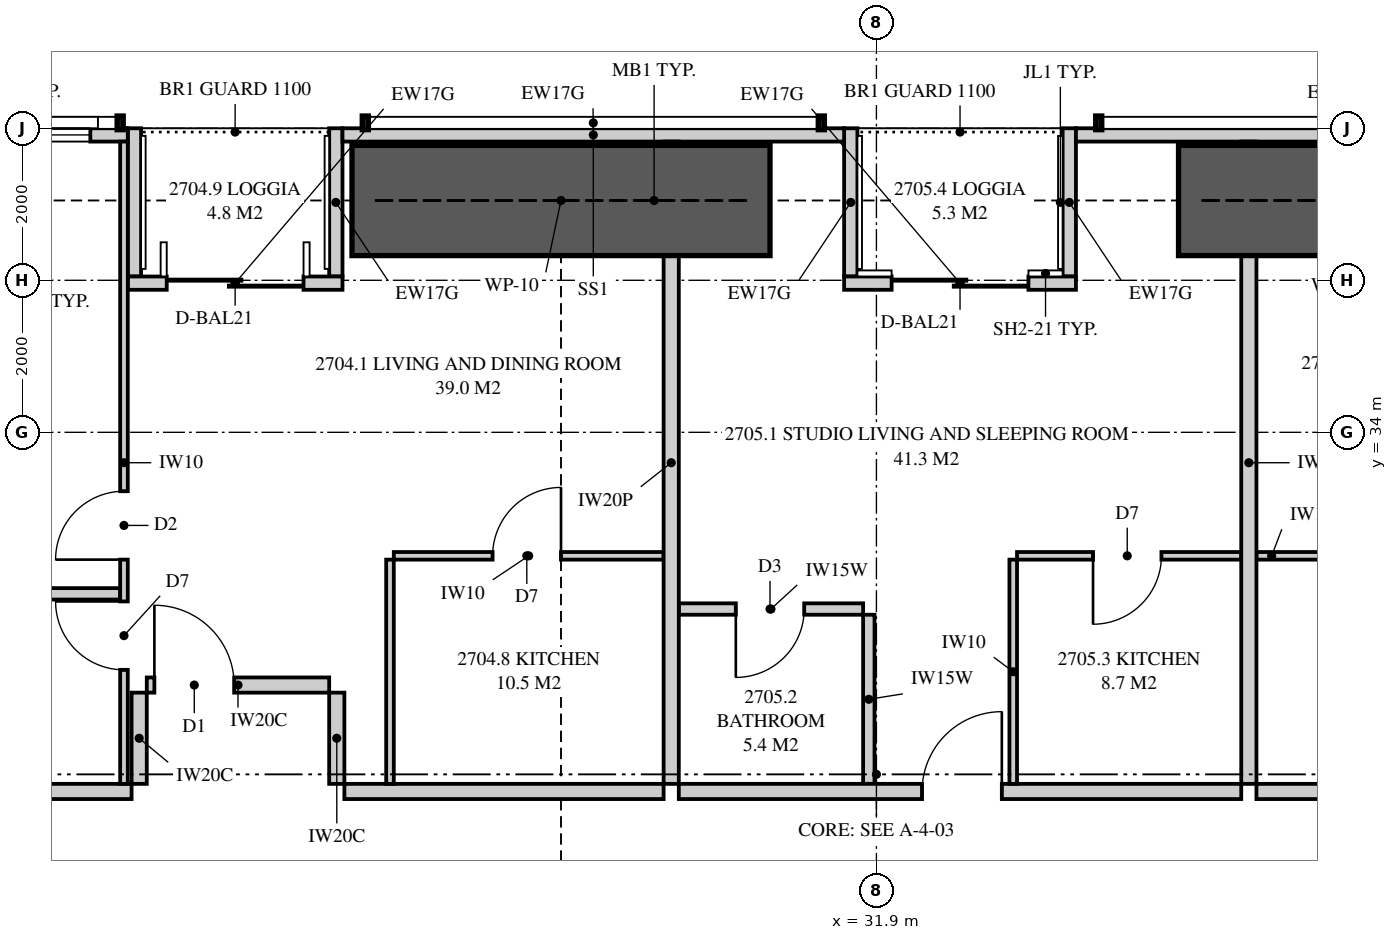
"""IFC4 building model, lengths in metres.
Left out: names, types, materials, properties, quantities, classifications, styles, units other than length and angle.
Written with IfcOpenShell. Run it as: python <this file> out.ifc"""

import sys

from ifc_helpers import new_model, si_unit, direction, frame, frame_2d, origin, place, context, subcontext, project, spatial, polyline, rectangle, outline, extrude, element, fill, save


model = new_model("IFC4")
c1 = context("Model", 3, precision=1e-05, world=origin(), true_north=direction((0.0, 1.0)))
c2 = subcontext(c1, "Body", "Model", "MODEL_VIEW")
j1 = project(units=[si_unit("LENGTHUNIT", "METRE"), si_unit("PLANEANGLEUNIT", "RADIAN")], contexts=[c1])
p1 = place(None, origin())
s1 = spatial("IfcSite", under=j1, at=p1, CompositionType="ELEMENT")
p2 = place(p1, origin())
s2 = spatial("IfcBuilding", under=s1, at=p2, CompositionType="ELEMENT")
p3 = place(p2, frame((0.0, 0.0, 101.5)))
s3 = spatial("IfcBuildingStorey", under=s2, at=p3, CompositionType="ELEMENT", Elevation=101.5)
p4 = place(p3, frame((41.449, 37.913, 0.0), z_axis=(0.0, 0.0, 1.0), x_axis=(-1.0, 0.0, 0.0)))
e1 = element("IfcWall", 1, at=p4, inside=s3, PredefinedType="SOLIDWALL", context=c2, shape_type="SweptSolid", body=[
    extrude(outline(polyline([(0.0, 0.0), (6.924, 0.0), (6.924, 2.15), (2.824, 2.15), (2.824, 3.11), (2.666, 3.11), (2.666, 2.15), (2.62, 2.15), (2.62, 3.11), (0.0, 3.11), (0.0, 0.0)])), frame((0.0, 0.087, 0.0), z_axis=(0.0, -1.0, 0.0), x_axis=(1.0, 0.0, 0.0)), (0.0, 0.0, 1.0), 0.175),
])
p5 = place(p3, frame((31.475, 37.913, 0.0), z_axis=(0.0, 0.0, 1.0), x_axis=(-1.0, 0.0, 0.0)))
e2 = element("IfcWall", 2, at=p5, inside=s3, PredefinedType="SOLIDWALL", context=c2, shape_type="SweptSolid", body=[
    extrude(rectangle(XDim=6.6, YDim=0.175, at=frame_2d((3.3, 0.0))), origin(), (0.0, 0.0, 1.0), 2.15),
])
p6 = place(p3, frame((22.05, 37.913, 0.0), z_axis=(0.0, 0.0, 1.0), x_axis=(-1.0, 0.0, 0.0)))
e3 = element("IfcWall", 3, at=p6, inside=s3, PredefinedType="SOLIDWALL", context=c2, shape_type="SweptSolid", body=[
    extrude(outline(polyline([(0.0, 0.0), (12.999, 0.0), (12.999, 3.11), (5.378, 3.11), (5.378, 2.15), (5.333, 2.15), (5.333, 3.11), (5.175, 3.11), (5.175, 2.15), (0.0, 2.15), (0.0, 0.0)])), frame((0.0, 0.087, 0.0), z_axis=(0.0, -1.0, 0.0), x_axis=(1.0, 0.0, 0.0)), (0.0, 0.0, 1.0), 0.175),
])
p7 = place(p6, frame((0.492, 0.0, 0.4)))
e4 = element("IfcOpeningElement", 4, at=p7, cuts=e3, PredefinedType="OPENING", context=c2, shape_type="SweptSolid", body=[
    extrude(rectangle(XDim=1.8, YDim=1.7, at=frame_2d((0.9, 0.85))), frame((0.0, 0.097, 0.0), z_axis=(0.0, -1.0, 0.0), x_axis=(1.0, 0.0, 0.0)), (0.0, 0.0, 1.0), 0.195),
])
p8 = place(p6, frame((8.065, 0.0, 0.4)))
e5 = element("IfcOpeningElement", 5, at=p8, cuts=e3, PredefinedType="OPENING", context=c2, shape_type="SweptSolid", body=[
    extrude(rectangle(XDim=1.8, YDim=1.7, at=frame_2d((0.9, 0.85))), frame((0.0, 0.097, 0.0), z_axis=(0.0, -1.0, 0.0), x_axis=(1.0, 0.0, 0.0)), (0.0, 0.0, 1.0), 0.195),
])
p9 = place(p3, frame((34.525, 35.962, 0.0), z_axis=(0.0, 0.0, 1.0), x_axis=(-1.0, 0.0, 0.0)))
e6 = element("IfcWall", 6, at=p9, inside=s3, PredefinedType="SOLIDWALL", context=c2, shape_type="SweptSolid", body=[
    extrude(rectangle(XDim=3.05, YDim=0.175, at=frame_2d((1.525, 0.0))), origin(), (0.0, 0.0, 1.0), 3.11),
])
p10 = place(p9, frame((0.625, 0.0, 0.0)))
e7 = element("IfcOpeningElement", 7, at=p10, cuts=e6, PredefinedType="OPENING", context=c2, shape_type="SweptSolid", body=[
    extrude(rectangle(XDim=1.8, YDim=2.1, at=frame_2d((0.9, 1.05))), frame((0.0, 0.097, 0.0), z_axis=(0.0, -1.0, 0.0), x_axis=(1.0, 0.0, 0.0)), (0.0, 0.0, 1.0), 0.195),
])
for number, where, z_axis, x_axis in (
    (8, (34.438, 38.0, 0.0), (0.0, 0.0, 1.0), (0.0, -1.0, 0.0)),
    (9, (31.562, 38.0, 0.0), (0.0, 0.0, 1.0), (0.0, -1.0, 0.0)),
):
    element("IfcWall", number, at=place(p3, frame(where, z_axis=z_axis, x_axis=x_axis)), inside=s3, PredefinedType="SOLIDWALL", context=c2, shape_type="SweptSolid", body=[
        extrude(outline(polyline([(0.0, 0.0), (1.95, 0.0), (1.95, 3.11), (1.75, 3.11), (1.75, 2.15), (0.15, 2.15), (0.15, 3.11), (0.0, 3.11), (0.0, 0.0)])), frame((0.0, 0.087, 0.0), z_axis=(0.0, -1.0, 0.0), x_axis=(1.0, 0.0, 0.0)), (0.0, 0.0, 1.0), 0.175),
    ])
p11 = place(p3, frame((24.875, 35.962, 0.0), z_axis=(0.0, 0.0, 1.0), x_axis=(-1.0, 0.0, 0.0)))
e10 = element("IfcWall", 10, at=p11, inside=s3, PredefinedType="SOLIDWALL", context=c2, shape_type="SweptSolid", body=[
    extrude(rectangle(XDim=2.825, YDim=0.175, at=frame_2d((1.413, 0.0))), origin(), (0.0, 0.0, 1.0), 3.11),
])
p12 = place(p11, frame((0.512, 0.0, 0.0)))
e11 = element("IfcOpeningElement", 11, at=p12, cuts=e10, PredefinedType="OPENING", context=c2, shape_type="SweptSolid", body=[
    extrude(rectangle(XDim=1.8, YDim=2.1, at=frame_2d((0.9, 1.05))), frame((0.0, 0.097, 0.0), z_axis=(0.0, -1.0, 0.0), x_axis=(1.0, 0.0, 0.0)), (0.0, 0.0, 1.0), 0.195),
])
for number, where, z_axis, x_axis in (
    (12, (24.788, 38.0, 0.0), (0.0, 0.0, 1.0), (0.0, -1.0, 0.0)),
    (13, (22.137, 38.0, 0.0), (0.0, 0.0, 1.0), (0.0, -1.0, 0.0)),
):
    element("IfcWall", number, at=place(p3, frame(where, z_axis=z_axis, x_axis=x_axis)), inside=s3, PredefinedType="SOLIDWALL", context=c2, shape_type="SweptSolid", body=[
        extrude(outline(polyline([(0.0, 0.0), (1.95, 0.0), (1.95, 3.11), (1.75, 3.11), (1.75, 2.15), (0.15, 2.15), (0.15, 3.11), (0.0, 3.11), (0.0, 0.0)])), frame((0.0, 0.087, 0.0), z_axis=(0.0, -1.0, 0.0), x_axis=(1.0, 0.0, 0.0)), (0.0, 0.0, 1.0), 0.175),
    ])
p13 = place(p3, frame((29.2, 37.825, 0.0), z_axis=(0.0, 0.0, 1.0), x_axis=(0.0, -1.0, 0.0)))
e14 = element("IfcWall", 14, at=p13, inside=s3, PredefinedType="PARTITIONING", context=c2, shape_type="SweptSolid", body=[
    extrude(outline(polyline([(0.529, 2.15), (0.0, 2.15), (0.0, 0.0), (0.529, 0.0), (0.529, 0.513), (1.021, 0.513), (1.021, 0.0), (8.45, 0.0), (8.45, 3.11), (1.685, 3.11), (1.685, 2.15), (1.021, 2.15), (1.021, 1.637), (0.529, 1.637), (0.529, 2.15)])), frame((0.0, 0.1, 0.0), z_axis=(0.0, -1.0, 0.0), x_axis=(1.0, 0.0, 0.0)), (0.0, 0.0, 1.0), 0.2),
])
p14 = place(p3, frame((17.775, 29.275, 0.0), z_axis=(0.0, 0.0, 1.0), x_axis=(1.0, 0.0, 0.0)))
e15 = element("IfcWall", 15, at=p14, inside=s3, PredefinedType="PARTITIONING", context=c2, shape_type="SweptSolid", body=[
    extrude(rectangle(XDim=4.325, YDim=0.2, at=frame_2d((2.163, 0.0))), origin(), (0.0, 0.0, 1.0), 3.11),
])
p15 = place(p3, frame((22.0, 37.825, 0.0), z_axis=(0.0, 0.0, 1.0), x_axis=(0.0, -1.0, 0.0)))
e16 = element("IfcWall", 16, at=p15, inside=s3, PredefinedType="PARTITIONING", context=c2, shape_type="SweptSolid", body=[
    extrude(outline(polyline([(0.0, 0.0), (8.45, 0.0), (8.45, 3.11), (1.635, 3.11), (1.635, 2.15), (0.0, 2.15), (0.0, 3.11), (0.0, 0.0)])), frame((0.0, 0.05, 0.0), z_axis=(0.0, -1.0, 0.0), x_axis=(1.0, 0.0, 0.0)), (0.0, 0.0, 1.0), 0.1),
])
p16 = place(p15, frame((4.6, 0.0, 0.0)))
e17 = element("IfcOpeningElement", 17, at=p16, cuts=e16, PredefinedType="OPENING", context=c2, shape_type="SweptSolid", body=[
    extrude(rectangle(XDim=0.9, YDim=2.1, at=frame_2d((0.45, 1.05))), frame((0.0, 0.06, 0.0), z_axis=(0.0, -1.0, 0.0), x_axis=(1.0, 0.0, 0.0)), (0.0, 0.0, 1.0), 0.12),
])
p17 = place(p15, frame((6.05, 0.0, 0.0)))
e18 = element("IfcOpeningElement", 18, at=p17, cuts=e16, PredefinedType="OPENING", context=c2, shape_type="SweptSolid", body=[
    extrude(rectangle(XDim=0.9, YDim=2.1, at=frame_2d((0.45, 1.05))), frame((0.0, 0.06, 0.0), z_axis=(0.0, -1.0, 0.0), x_axis=(1.0, 0.0, 0.0)), (0.0, 0.0, 1.0), 0.12),
])
p18 = place(p3, frame((17.75, 31.875, 0.0), z_axis=(0.0, 0.0, 1.0), x_axis=(1.0, 0.0, 0.0)))
e19 = element("IfcWall", 19, at=p18, inside=s3, PredefinedType="PLUMBINGWALL", context=c2, shape_type="SweptSolid", body=[
    extrude(rectangle(XDim=4.2, YDim=0.15, at=frame_2d((2.1, 0.0))), origin(), (0.0, 0.0, 1.0), 3.11),
])
p19 = place(p3, frame((25.55, 32.375, 0.0), z_axis=(0.0, 0.0, 1.0), x_axis=(1.0, 0.0, 0.0)))
e20 = element("IfcWall", 20, at=p19, inside=s3, PredefinedType="PARTITIONING", context=c2, shape_type="SweptSolid", body=[
    extrude(outline(polyline([(0.0, 0.0), (3.55, 0.0), (3.55, 3.11), (2.487, 3.11), (2.487, 2.541), (1.913, 2.541), (1.913, 3.11), (0.0, 3.11), (0.0, 0.0)])), frame((0.0, 0.05, 0.0), z_axis=(0.0, -1.0, 0.0), x_axis=(1.0, 0.0, 0.0)), (0.0, 0.0, 1.0), 0.1),
])
p20 = place(p19, frame((1.3, 0.0, 0.0)))
e21 = element("IfcOpeningElement", 21, at=p20, cuts=e20, PredefinedType="OPENING", context=c2, shape_type="SweptSolid", body=[
    extrude(rectangle(XDim=0.9, YDim=2.1, at=frame_2d((0.45, 1.05))), frame((0.0, 0.06, 0.0), z_axis=(0.0, -1.0, 0.0), x_axis=(1.0, 0.0, 0.0)), (0.0, 0.0, 1.0), 0.12),
])
p21 = place(p3, frame((25.5, 32.325, 0.0), z_axis=(0.0, 0.0, 1.0), x_axis=(0.0, -1.0, 0.0)))
e22 = element("IfcWall", 22, at=p21, inside=s3, PredefinedType="PARTITIONING", context=c2, shape_type="SweptSolid", body=[
    extrude(rectangle(XDim=2.95, YDim=0.1, at=frame_2d((1.475, 0.0))), origin(), (0.0, 0.0, 1.0), 3.11),
])
p22 = place(p3, frame((36.8, 37.825, 0.0), z_axis=(0.0, 0.0, 1.0), x_axis=(0.0, -1.0, 0.0)))
e23 = element("IfcWall", 23, at=p22, inside=s3, PredefinedType="PARTITIONING", context=c2, shape_type="SweptSolid", body=[
    extrude(outline(polyline([(0.529, 2.15), (0.0, 2.15), (0.0, 0.0), (0.529, 0.0), (0.529, 0.256), (1.021, 0.256), (1.021, 0.0), (8.45, 0.0), (8.45, 3.11), (1.685, 3.11), (1.685, 2.15), (1.021, 2.15), (1.021, 1.894), (0.529, 1.894), (0.529, 2.15)])), frame((0.0, 0.1, 0.0), z_axis=(0.0, -1.0, 0.0), x_axis=(1.0, 0.0, 0.0)), (0.0, 0.0, 1.0), 0.2),
])
p23 = place(p3, frame((29.3, 29.275, 0.0), z_axis=(0.0, 0.0, 1.0), x_axis=(1.0, 0.0, 0.0)))
e24 = element("IfcWall", 24, at=p23, inside=s3, PredefinedType="PARTITIONING", context=c2, shape_type="SweptSolid", body=[
    extrude(rectangle(XDim=7.4, YDim=0.2, at=frame_2d((3.7, 0.0))), origin(), (0.0, 0.0, 1.0), 3.11),
])
p24 = place(p23, frame((3.2, 0.0, 0.0)))
e25 = element("IfcOpeningElement", 25, at=p24, cuts=e24, PredefinedType="OPENING", context=c2, shape_type="SweptSolid", body=[
    extrude(rectangle(XDim=1.05, YDim=2.2, at=frame_2d((0.525, 1.1))), frame((0.0, 0.11, 0.0), z_axis=(0.0, -1.0, 0.0), x_axis=(1.0, 0.0, 0.0)), (0.0, 0.0, 1.0), 0.22),
])
p25 = place(p3, frame((29.3, 31.675, 0.0), z_axis=(0.0, 0.0, 1.0), x_axis=(1.0, 0.0, 0.0)))
e26 = element("IfcWall", 26, at=p25, inside=s3, PredefinedType="PLUMBINGWALL", context=c2, shape_type="SweptSolid", body=[
    extrude(rectangle(XDim=2.425, YDim=0.15, at=frame_2d((1.212, 0.0))), origin(), (0.0, 0.0, 1.0), 3.11),
])
p26 = place(p25, frame((0.75, 0.0, 0.0)))
e27 = element("IfcOpeningElement", 27, at=p26, cuts=e26, PredefinedType="OPENING", context=c2, shape_type="SweptSolid", body=[
    extrude(rectangle(XDim=0.9, YDim=2.1, at=frame_2d((0.45, 1.05))), frame((0.0, 0.085, 0.0), z_axis=(0.0, -1.0, 0.0), x_axis=(1.0, 0.0, 0.0)), (0.0, 0.0, 1.0), 0.17),
])
p27 = place(p3, frame((31.8, 31.6, 0.0), z_axis=(0.0, 0.0, 1.0), x_axis=(0.0, -1.0, 0.0)))
e28 = element("IfcWall", 28, at=p27, inside=s3, PredefinedType="PLUMBINGWALL", context=c2, shape_type="SweptSolid", body=[
    extrude(rectangle(XDim=2.225, YDim=0.15, at=frame_2d((1.113, 0.0))), origin(), (0.0, 0.0, 1.0), 3.11),
])
p28 = place(p3, frame((33.75, 32.375, 0.0), z_axis=(0.0, 0.0, 1.0), x_axis=(1.0, 0.0, 0.0)))
e29 = element("IfcWall", 29, at=p28, inside=s3, PredefinedType="PARTITIONING", context=c2, shape_type="SweptSolid", body=[
    extrude(rectangle(XDim=2.95, YDim=0.1, at=frame_2d((1.475, 0.0))), origin(), (0.0, 0.0, 1.0), 3.11),
])
p29 = place(p28, frame((1.0, 0.0, 0.0)))
e30 = element("IfcOpeningElement", 30, at=p29, cuts=e29, PredefinedType="OPENING", context=c2, shape_type="SweptSolid", body=[
    extrude(rectangle(XDim=0.9, YDim=2.1, at=frame_2d((0.45, 1.05))), frame((0.0, 0.06, 0.0), z_axis=(0.0, -1.0, 0.0), x_axis=(1.0, 0.0, 0.0)), (0.0, 0.0, 1.0), 0.12),
])
p30 = place(p3, frame((33.7, 32.325, 0.0), z_axis=(0.0, 0.0, 1.0), x_axis=(0.0, -1.0, 0.0)))
e31 = element("IfcWall", 31, at=p30, inside=s3, PredefinedType="PARTITIONING", context=c2, shape_type="SweptSolid", body=[
    extrude(rectangle(XDim=2.95, YDim=0.1, at=frame_2d((1.475, 0.0))), origin(), (0.0, 0.0, 1.0), 3.11),
])
p31 = place(p3, frame((36.9, 29.275, 0.0), z_axis=(0.0, 0.0, 1.0), x_axis=(1.0, 0.0, 0.0)))
e32 = element("IfcWall", 32, at=p31, inside=s3, PredefinedType="PARTITIONING", context=c2, shape_type="SweptSolid", body=[
    extrude(outline(polyline([(0.0, 0.0), (9.125, 0.0), (9.125, 3.11), (2.062, 3.11), (2.062, 2.541), (1.388, 2.541), (1.388, 3.11), (0.0, 3.11), (0.0, 0.0)])), frame((0.0, 0.1, 0.0), z_axis=(0.0, -1.0, 0.0), x_axis=(1.0, 0.0, 0.0)), (0.0, 0.0, 1.0), 0.2),
])
p32 = place(p31, frame((4.5, 0.0, 0.0)))
e33 = element("IfcOpeningElement", 33, at=p32, cuts=e32, PredefinedType="OPENING", context=c2, shape_type="SweptSolid", body=[
    extrude(rectangle(XDim=1.05, YDim=2.2, at=frame_2d((0.525, 1.1))), frame((0.0, 0.11, 0.0), z_axis=(0.0, -1.0, 0.0), x_axis=(1.0, 0.0, 0.0)), (0.0, 0.0, 1.0), 0.22),
])
p33 = place(p3, frame((36.9, 32.375, 0.0), z_axis=(0.0, 0.0, 1.0), x_axis=(1.0, 0.0, 0.0)))
e34 = element("IfcWall", 34, at=p33, inside=s3, PredefinedType="PARTITIONING", context=c2, shape_type="SweptSolid", body=[
    extrude(outline(polyline([(0.0, 0.0), (3.55, 0.0), (3.55, 3.11), (2.012, 3.11), (2.012, 2.541), (1.438, 2.541), (1.438, 3.11), (0.0, 3.11), (0.0, 0.0)])), frame((0.0, 0.05, 0.0), z_axis=(0.0, -1.0, 0.0), x_axis=(1.0, 0.0, 0.0)), (0.0, 0.0, 1.0), 0.1),
])
p34 = place(p33, frame((1.35, 0.0, 0.0)))
e35 = element("IfcOpeningElement", 35, at=p34, cuts=e34, PredefinedType="OPENING", context=c2, shape_type="SweptSolid", body=[
    extrude(rectangle(XDim=0.9, YDim=2.1, at=frame_2d((0.45, 1.05))), frame((0.0, 0.06, 0.0), z_axis=(0.0, -1.0, 0.0), x_axis=(1.0, 0.0, 0.0)), (0.0, 0.0, 1.0), 0.12),
])
p35 = place(p3, frame((24.9, 29.275, 0.0), z_axis=(0.0, 0.0, 1.0), x_axis=(1.0, 0.0, 0.0)))
e36 = element("IfcWall", 36, at=p35, inside=s3, PredefinedType="PARTITIONING", context=c2, shape_type="SweptSolid", body=[
    extrude(outline(polyline([(0.0, 0.0), (4.2, 0.0), (4.2, 3.11), (3.187, 3.11), (3.187, 2.541), (2.513, 2.541), (2.513, 3.11), (0.0, 3.11), (0.0, 0.0)])), frame((0.0, 0.1, 0.0), z_axis=(0.0, -1.0, 0.0), x_axis=(1.0, 0.0, 0.0)), (0.0, 0.0, 1.0), 0.2),
])
p36 = place(p3, frame((22.3, 30.675, 0.0), z_axis=(0.0, 0.0, 1.0), x_axis=(1.0, 0.0, 0.0)))
e37 = element("IfcWall", 37, at=p36, inside=s3, PredefinedType="PARTITIONING", context=c2, shape_type="SweptSolid", body=[
    extrude(rectangle(XDim=2.4, YDim=0.2, at=frame_2d((1.2, 0.0))), origin(), (0.0, 0.0, 1.0), 3.11),
])
p37 = place(p36, frame((0.1, 0.0, 0.0)))
e38 = element("IfcOpeningElement", 38, at=p37, cuts=e37, PredefinedType="OPENING", context=c2, shape_type="SweptSolid", body=[
    extrude(rectangle(XDim=1.05, YDim=2.2, at=frame_2d((0.525, 1.1))), frame((0.0, 0.11, 0.0), z_axis=(0.0, -1.0, 0.0), x_axis=(1.0, 0.0, 0.0)), (0.0, 0.0, 1.0), 0.22),
])
for number, where, z_axis, x_axis in (
    (39, (22.2, 29.375, 0.0), (0.0, 0.0, 1.0), (0.0, 1.0, 0.0)),
    (40, (24.8, 29.375, 0.0), (0.0, 0.0, 1.0), (0.0, 1.0, 0.0)),
):
    element("IfcWall", number, at=place(p3, frame(where, z_axis=z_axis, x_axis=x_axis)), inside=s3, PredefinedType="PARTITIONING", context=c2, shape_type="SweptSolid", body=[
        extrude(rectangle(XDim=1.2, YDim=0.2, at=frame_2d((0.6, 0.0))), origin(), (0.0, 0.0, 1.0), 3.11),
    ])
for number, where, z_axis, x_axis in (
    (41, (35.875, 37.05, 0.0), (0.0, 0.0, 1.0), (1.0, 0.0, 0.0)),
    (42, (25.0, 37.05, 0.0), (0.0, 0.0, 1.0), (1.0, 0.0, 0.0)),
):
    element("IfcWall", number, at=place(p3, frame(where, z_axis=z_axis, x_axis=x_axis)), inside=s3, PredefinedType="SHEAR", context=c2, shape_type="SweptSolid", body=[
        extrude(rectangle(XDim=5.5, YDim=1.45, at=frame_2d((2.75, 0.0))), origin(), (0.0, 0.0, 1.0), 3.35),
    ])
p38 = place(p10, origin())
e43 = element("IfcDoor", 43, at=p38, inside=s3, OperationType="SLIDING_TO_LEFT", PredefinedType="DOOR", context=c2, shape_type="SweptSolid", body=[
    extrude(rectangle(XDim=1.8, YDim=2.1, at=frame_2d((0.9, 1.05))), frame((0.0, 0.025, 0.0), z_axis=(0.0, -1.0, 0.0), x_axis=(1.0, 0.0, 0.0)), (0.0, 0.0, 1.0), 0.05),
])
fill(e7, e43)
p39 = place(p12, origin())
e44 = element("IfcDoor", 44, at=p39, inside=s3, OperationType="SLIDING_TO_LEFT", PredefinedType="DOOR", context=c2, shape_type="SweptSolid", body=[
    extrude(rectangle(XDim=1.8, YDim=2.1, at=frame_2d((0.9, 1.05))), frame((0.0, 0.025, 0.0), z_axis=(0.0, -1.0, 0.0), x_axis=(1.0, 0.0, 0.0)), (0.0, 0.0, 1.0), 0.05),
])
fill(e11, e44)
p40 = place(p7, origin())
e45 = element("IfcWindow", 45, at=p40, inside=s3, PartitioningType="SINGLE_PANEL", PredefinedType="WINDOW", context=c2, shape_type="SweptSolid", body=[
    extrude(rectangle(XDim=1.8, YDim=1.7, at=frame_2d((0.9, 0.85))), frame((0.0, 0.03, 0.0), z_axis=(0.0, -1.0, 0.0), x_axis=(1.0, 0.0, 0.0)), (0.0, 0.0, 1.0), 0.06),
])
fill(e4, e45)
p41 = place(p37, origin())
e46 = element("IfcDoor", 46, at=p41, inside=s3, OperationType="SINGLE_SWING_LEFT", PredefinedType="DOOR", context=c2, shape_type="SweptSolid", body=[
    extrude(rectangle(XDim=1.05, YDim=2.2, at=frame_2d((0.525, 1.1))), frame((0.0, 0.025, 0.0), z_axis=(0.0, -1.0, 0.0), x_axis=(1.0, 0.0, 0.0)), (0.0, 0.0, 1.0), 0.05),
])
fill(e38, e46)
p42 = place(p16, frame((0.9, 0.0, 0.0), z_axis=(0.0, 0.0, 1.0), x_axis=(-1.0, 0.0, 0.0)))
e47 = element("IfcDoor", 47, at=p42, inside=s3, OperationType="SINGLE_SWING_LEFT", PredefinedType="DOOR", context=c2, shape_type="SweptSolid", body=[
    extrude(rectangle(XDim=0.9, YDim=2.1, at=frame_2d((0.45, 1.05))), frame((0.0, 0.025, 0.0), z_axis=(0.0, -1.0, 0.0), x_axis=(1.0, 0.0, 0.0)), (0.0, 0.0, 1.0), 0.05),
])
fill(e17, e47)
p43 = place(p17, frame((0.9, 0.0, 0.0), z_axis=(0.0, 0.0, 1.0), x_axis=(-1.0, 0.0, 0.0)))
e48 = element("IfcDoor", 48, at=p43, inside=s3, OperationType="SINGLE_SWING_RIGHT", PredefinedType="DOOR", context=c2, shape_type="SweptSolid", body=[
    extrude(rectangle(XDim=0.9, YDim=2.1, at=frame_2d((0.45, 1.05))), frame((0.0, 0.025, 0.0), z_axis=(0.0, -1.0, 0.0), x_axis=(1.0, 0.0, 0.0)), (0.0, 0.0, 1.0), 0.05),
])
fill(e18, e48)
p44 = place(p20, origin())
e49 = element("IfcDoor", 49, at=p44, inside=s3, OperationType="SINGLE_SWING_RIGHT", PredefinedType="DOOR", context=c2, shape_type="SweptSolid", body=[
    extrude(rectangle(XDim=0.9, YDim=2.1, at=frame_2d((0.45, 1.05))), frame((0.0, 0.025, 0.0), z_axis=(0.0, -1.0, 0.0), x_axis=(1.0, 0.0, 0.0)), (0.0, 0.0, 1.0), 0.05),
])
fill(e21, e49)
p45 = place(p24, origin())
e50 = element("IfcDoor", 50, at=p45, inside=s3, OperationType="SINGLE_SWING_RIGHT", PredefinedType="DOOR", context=c2, shape_type="SweptSolid", body=[
    extrude(rectangle(XDim=1.05, YDim=2.2, at=frame_2d((0.525, 1.1))), frame((0.0, 0.025, 0.0), z_axis=(0.0, -1.0, 0.0), x_axis=(1.0, 0.0, 0.0)), (0.0, 0.0, 1.0), 0.05),
])
fill(e25, e50)
p46 = place(p26, frame((0.9, 0.0, 0.0), z_axis=(0.0, 0.0, 1.0), x_axis=(-1.0, 0.0, 0.0)))
e51 = element("IfcDoor", 51, at=p46, inside=s3, OperationType="SINGLE_SWING_RIGHT", PredefinedType="DOOR", context=c2, shape_type="SweptSolid", body=[
    extrude(rectangle(XDim=0.9, YDim=2.1, at=frame_2d((0.45, 1.05))), frame((0.0, 0.025, 0.0), z_axis=(0.0, -1.0, 0.0), x_axis=(1.0, 0.0, 0.0)), (0.0, 0.0, 1.0), 0.05),
])
fill(e27, e51)
p47 = place(p29, frame((0.9, 0.0, 0.0), z_axis=(0.0, 0.0, 1.0), x_axis=(-1.0, 0.0, 0.0)))
e52 = element("IfcDoor", 52, at=p47, inside=s3, OperationType="SINGLE_SWING_RIGHT", PredefinedType="DOOR", context=c2, shape_type="SweptSolid", body=[
    extrude(rectangle(XDim=0.9, YDim=2.1, at=frame_2d((0.45, 1.05))), frame((0.0, 0.025, 0.0), z_axis=(0.0, -1.0, 0.0), x_axis=(1.0, 0.0, 0.0)), (0.0, 0.0, 1.0), 0.05),
])
fill(e30, e52)
save(model, sys.argv[1])
